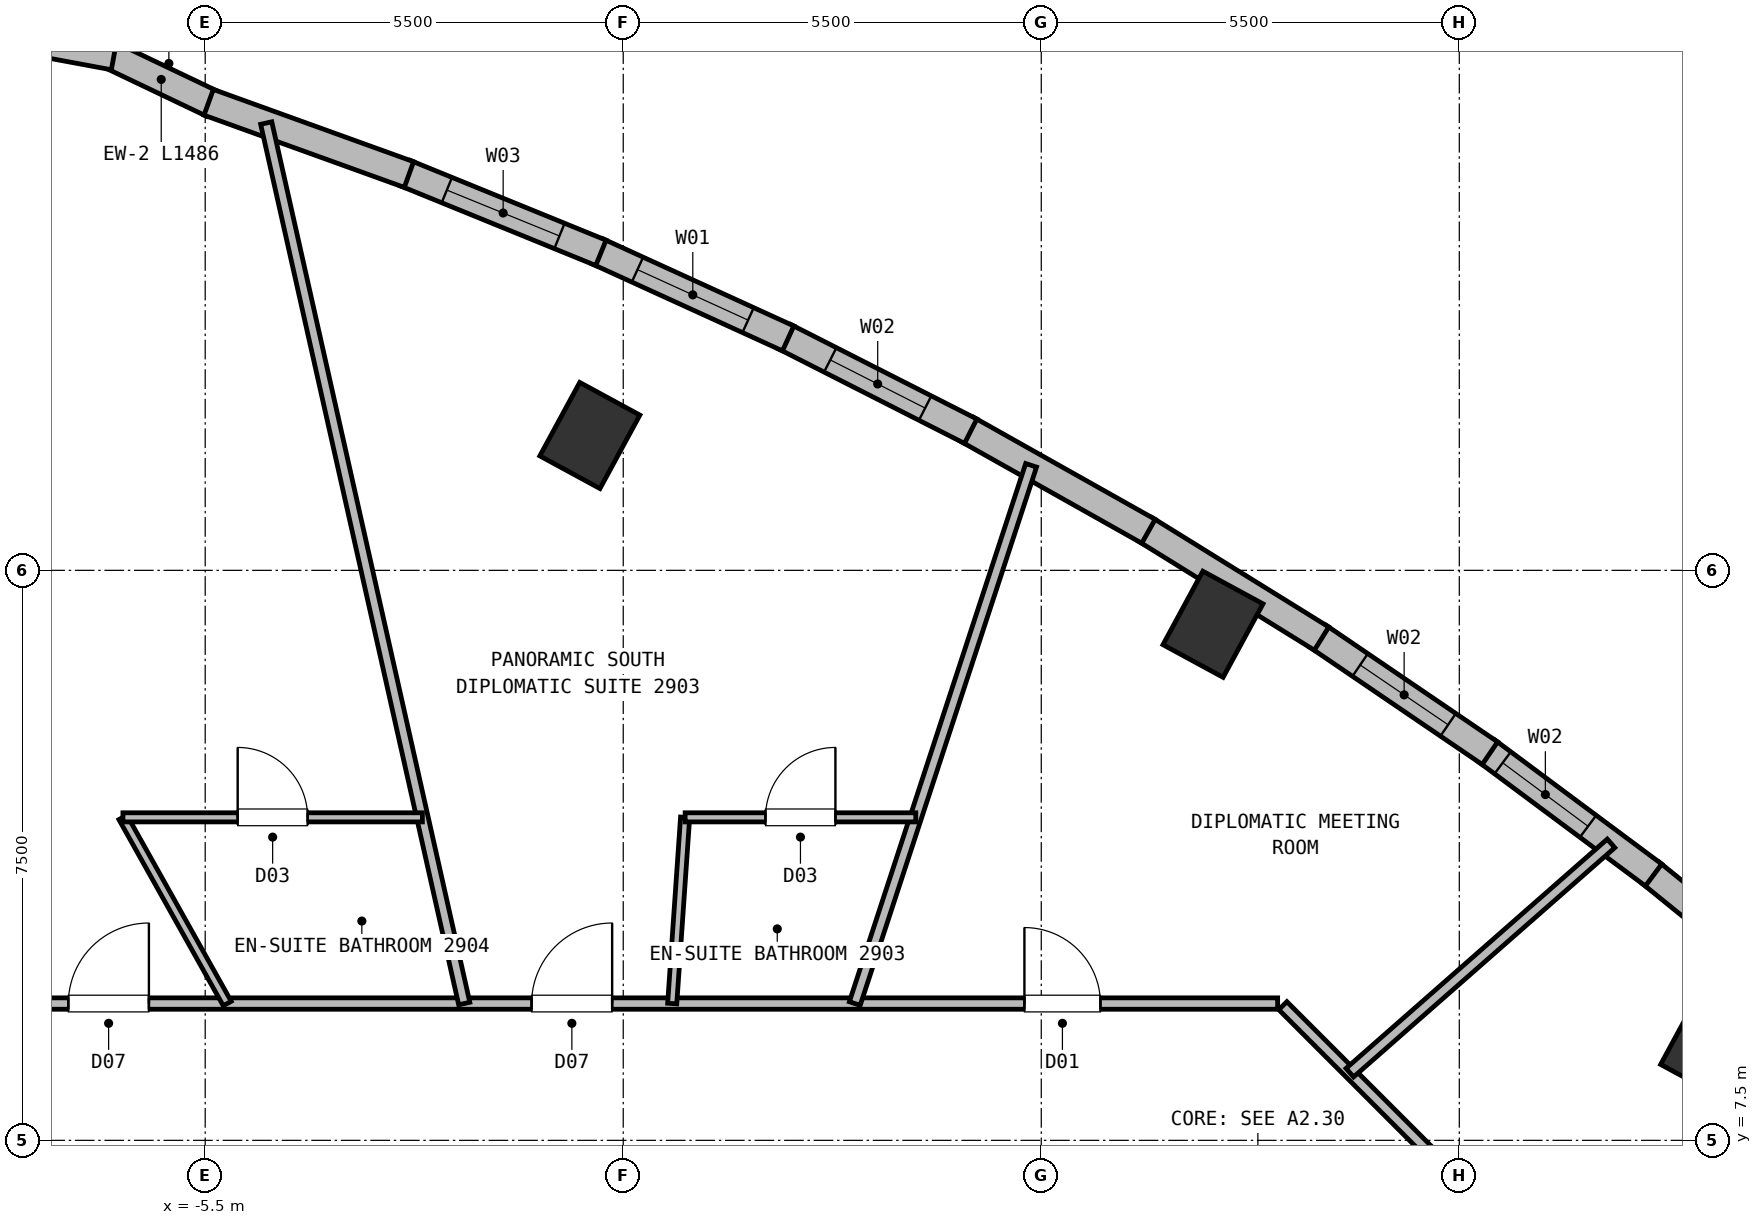
"""IFC4 building model, lengths in metres.
Left out: names, types, materials, properties, quantities, classifications, styles, units other than length and angle.
Written with IfcOpenShell. Run it as: python <this file> out.ifc"""

import sys

from ifc_helpers import new_model, si_unit, direction, frame, frame_2d, origin, origin_2d, place, context, subcontext, project, spatial, rectangle, extrude, element, fill, save


model = new_model("IFC4")
c1 = context("Model", 3, precision=1e-05, world=origin(), true_north=direction((0.0, 1.0)))
c2 = subcontext(c1, "Body", "Model", "MODEL_VIEW")
j1 = project(units=[si_unit("LENGTHUNIT", "METRE"), si_unit("PLANEANGLEUNIT", "RADIAN")], contexts=[c1])
p1 = place(None, origin())
s1 = spatial("IfcSite", under=j1, at=p1, CompositionType="ELEMENT")
p2 = place(p1, origin())
s2 = spatial("IfcBuilding", under=s1, at=p2, CompositionType="ELEMENT")
p3 = place(p2, frame((0.0, 0.0, 108.5)))
s3 = spatial("IfcBuildingStorey", under=s2, at=p3, CompositionType="ELEMENT", Elevation=108.5)
for number, where, z_axis, x_axis in (
    (1, (14.307, 8.767, 0.0), (0.0, 0.0, 1.0), (-0.879, 0.477, 0.0)),
    (2, (7.759, 14.29, 0.0), (0.0, 0.0, 1.0), (-0.879, 0.477, 0.0)),
    (3, (-0.439, 16.774, 0.0), (0.0, 0.0, 1.0), (-0.879, 0.477, 0.0)),
):
    element("IfcColumn", number, at=place(p3, frame(where, z_axis=z_axis, x_axis=x_axis)), inside=s3, PredefinedType="COLUMN", context=c2, shape_type="SweptSolid", body=[
        extrude(rectangle(XDim=0.9, YDim=1.1, at=origin_2d()), origin(), (0.0, 0.0, 1.0), 3.75),
    ])
p4 = place(p3, frame((-6.749, 21.779, 0.0), z_axis=(0.0, 0.0, 1.0), x_axis=(0.902586982789, -0.430507535938, 0.0)))
e4 = element("IfcWall", 4, at=p4, inside=s3, PredefinedType="SOLIDWALL", context=c2, shape_type="SweptSolid", body=[
    extrude(rectangle(XDim=1.486, YDim=0.36, at=frame_2d((0.743, 0.0))), origin(), (0.0, 0.0, 1.0), 3.5),
])
p5 = place(p3, frame((-8.163, 22.034, 0.0), z_axis=(0.0, 0.0, 1.0), x_axis=(0.983262389335, -0.182195152844, 0.0)))
e5 = element("IfcWall", 5, at=p5, inside=s3, PredefinedType="SOLIDWALL", context=c2, shape_type="SweptSolid", body=[
    extrude(rectangle(XDim=1.486, YDim=0.36, at=frame_2d((0.743, 0.0))), origin(), (0.0, 0.0, 1.0), 3.5),
])
p6 = place(p3, frame((13.516, 11.021, 0.0), z_axis=(0.0, 0.0, 1.0), x_axis=(0.776448630517, -0.630180548866, 0.0)))
e6 = element("IfcWall", 6, at=p6, inside=s3, PredefinedType="SOLIDWALL", context=c2, shape_type="SweptSolid", body=[
    extrude(rectangle(XDim=2.744, YDim=0.36, at=frame_2d((1.372, 0.0))), origin(), (0.0, 0.0, 1.0), 3.5),
])
p7 = place(p6, frame((0.672, 0.0, 0.72)))
e7 = element("IfcOpeningElement", 7, at=p7, cuts=e6, PredefinedType="OPENING", context=c2, shape_type="SweptSolid", body=[
    extrude(rectangle(XDim=1.4, YDim=1.84, at=frame_2d((0.7, 0.92))), frame((0.0, 0.19, 0.0), z_axis=(0.0, -1.0, 0.0), x_axis=(1.0, 0.0, 0.0)), (0.0, 0.0, 1.0), 0.38),
])
p8 = place(p3, frame((11.362, 12.623, 0.0), z_axis=(0.0, 0.0, 1.0), x_axis=(0.802329676415, -0.596881135859, 0.0)))
e8 = element("IfcWall", 8, at=p8, inside=s3, PredefinedType="SOLIDWALL", context=c2, shape_type="SweptSolid", body=[
    extrude(rectangle(XDim=2.734, YDim=0.36, at=frame_2d((1.367, 0.0))), origin(), (0.0, 0.0, 1.0), 3.5),
])
p9 = place(p8, frame((0.26, 0.0, 0.72)))
e9 = element("IfcOpeningElement", 9, at=p9, cuts=e8, PredefinedType="OPENING", context=c2, shape_type="SweptSolid", body=[
    extrude(rectangle(XDim=1.4, YDim=1.84, at=frame_2d((0.7, 0.92))), frame((0.0, 0.19, 0.0), z_axis=(0.0, -1.0, 0.0), x_axis=(1.0, 0.0, 0.0)), (0.0, 0.0, 1.0), 0.38),
])
p10 = place(p3, frame((9.146, 14.129, 0.0), z_axis=(0.0, 0.0, 1.0), x_axis=(0.826868273885, -0.562395641557, 0.0)))
e10 = element("IfcWall", 10, at=p10, inside=s3, PredefinedType="SOLIDWALL", context=c2, shape_type="SweptSolid", body=[
    extrude(rectangle(XDim=2.73, YDim=0.36, at=frame_2d((1.365, 0.0))), origin(), (0.0, 0.0, 1.0), 3.5),
])
p11 = place(p10, frame((0.665, 0.0, 0.72)))
e11 = element("IfcOpeningElement", 11, at=p11, cuts=e10, PredefinedType="OPENING", context=c2, shape_type="SweptSolid", body=[
    extrude(rectangle(XDim=1.4, YDim=1.84, at=frame_2d((0.7, 0.92))), frame((0.0, 0.19, 0.0), z_axis=(0.0, -1.0, 0.0), x_axis=(1.0, 0.0, 0.0)), (0.0, 0.0, 1.0), 0.38),
])
p12 = place(p3, frame((6.867, 15.54, 0.0), z_axis=(0.0, 0.0, 1.0), x_axis=(0.850066866235, -0.526674779091, 0.0)))
e12 = element("IfcWall", 12, at=p12, inside=s3, PredefinedType="SOLIDWALL", context=c2, shape_type="SweptSolid", body=[
    extrude(rectangle(XDim=2.73, YDim=0.36, at=frame_2d((1.365, 0.0))), origin(), (0.0, 0.0, 1.0), 3.5),
])
p13 = place(p3, frame((4.527, 16.854, 0.0), z_axis=(0.0, 0.0, 1.0), x_axis=(0.871580305906, -0.490252761702, 0.0)))
e13 = element("IfcWall", 13, at=p13, inside=s3, PredefinedType="SOLIDWALL", context=c2, shape_type="SweptSolid", body=[
    extrude(rectangle(XDim=2.734, YDim=0.36, at=frame_2d((1.367, 0.0))), origin(), (0.0, 0.0, 1.0), 3.5),
])
p14 = place(p3, frame((2.125, 18.073, 0.0), z_axis=(0.0, 0.0, 1.0), x_axis=(0.891561759687, -0.452899137406, 0.0)))
e14 = element("IfcWall", 14, at=p14, inside=s3, PredefinedType="SOLIDWALL", context=c2, shape_type="SweptSolid", body=[
    extrude(rectangle(XDim=2.744, YDim=0.36, at=frame_2d((1.372, 0.0))), origin(), (0.0, 0.0, 1.0), 3.5),
])
p15 = place(p14, frame((0.672, 0.0, 0.72)))
e15 = element("IfcOpeningElement", 15, at=p15, cuts=e14, PredefinedType="OPENING", context=c2, shape_type="SweptSolid", body=[
    extrude(rectangle(XDim=1.4, YDim=1.84, at=frame_2d((0.7, 0.92))), frame((0.0, 0.19, 0.0), z_axis=(0.0, -1.0, 0.0), x_axis=(1.0, 0.0, 0.0)), (0.0, 0.0, 1.0), 0.38),
])
p16 = place(p3, frame((-0.34, 19.198, 0.0), z_axis=(0.0, 0.0, 1.0), x_axis=(0.909692365211, -0.415282796028, 0.0)))
e16 = element("IfcWall", 16, at=p16, inside=s3, PredefinedType="SOLIDWALL", context=c2, shape_type="SweptSolid", body=[
    extrude(rectangle(XDim=2.758, YDim=0.36, at=frame_2d((1.379, 0.0))), origin(), (0.0, 0.0, 1.0), 3.5),
])
p17 = place(p16, frame((0.579, 0.0, 0.72)))
e17 = element("IfcOpeningElement", 17, at=p17, cuts=e16, PredefinedType="OPENING", context=c2, shape_type="SweptSolid", body=[
    extrude(rectangle(XDim=1.6, YDim=1.88, at=frame_2d((0.8, 0.94))), frame((0.0, 0.19, 0.0), z_axis=(0.0, -1.0, 0.0), x_axis=(1.0, 0.0, 0.0)), (0.0, 0.0, 1.0), 0.38),
])
p18 = place(p3, frame((-2.866, 20.226, 0.0), z_axis=(0.0, 0.0, 1.0), x_axis=(0.926106009393, -0.377263381958, 0.0)))
e18 = element("IfcWall", 18, at=p18, inside=s3, PredefinedType="SOLIDWALL", context=c2, shape_type="SweptSolid", body=[
    extrude(rectangle(XDim=2.778, YDim=0.36, at=frame_2d((1.389, 0.0))), origin(), (0.0, 0.0, 1.0), 3.5),
])
p19 = place(p18, frame((0.589, 0.0, 0.72)))
e19 = element("IfcOpeningElement", 19, at=p19, cuts=e18, PredefinedType="OPENING", context=c2, shape_type="SweptSolid", body=[
    extrude(rectangle(XDim=1.6, YDim=1.88, at=frame_2d((0.8, 0.94))), frame((0.0, 0.19, 0.0), z_axis=(0.0, -1.0, 0.0), x_axis=(1.0, 0.0, 0.0)), (0.0, 0.0, 1.0), 0.38),
])
p20 = place(p3, frame((-5.454, 21.159, 0.0), z_axis=(0.0, 0.0, 1.0), x_axis=(0.94061266542, -0.339481683822, 0.0)))
e20 = element("IfcWall", 20, at=p20, inside=s3, PredefinedType="SOLIDWALL", context=c2, shape_type="SweptSolid", body=[
    extrude(rectangle(XDim=2.801, YDim=0.36, at=frame_2d((1.4, 0.0))), origin(), (0.0, 0.0, 1.0), 3.5),
])
p21 = place(p3, frame((8.678, 9.272, 0.0), z_axis=(0.0, 0.0, 1.0), x_axis=(0.707106781187, -0.707106781187, 0.0)))
e21 = element("IfcWall", 21, at=p21, inside=s3, PredefinedType="PARTITIONING", context=c2, shape_type="SweptSolid", body=[
    extrude(rectangle(XDim=2.89, YDim=0.15, at=frame_2d((1.445, 0.0))), origin(), (0.0, 0.0, 1.0), 3.5),
])
p22 = place(p3, frame((-8.61, 9.3, 0.0), z_axis=(0.0, 0.0, 1.0), x_axis=(1.0, 0.0, 0.0)))
e22 = element("IfcWall", 22, at=p22, inside=s3, PredefinedType="PARTITIONING", context=c2, shape_type="SweptSolid", body=[
    extrude(rectangle(XDim=17.22, YDim=0.15, at=frame_2d((8.61, 0.0))), origin(), (0.0, 0.0, 1.0), 3.5),
])
p23 = place(p22, frame((13.888, 0.0, 0.0)))
e23 = element("IfcOpeningElement", 23, at=p23, cuts=e22, PredefinedType="OPENING", context=c2, shape_type="SweptSolid", body=[
    extrude(rectangle(XDim=1.0, YDim=2.15, at=frame_2d((0.5, 1.075))), frame((0.0, 0.085, 0.0), z_axis=(0.0, -1.0, 0.0), x_axis=(1.0, 0.0, 0.0)), (0.0, 0.0, 1.0), 0.17),
])
p24 = place(p22, frame((7.404, 0.0, 0.0)))
e24 = element("IfcOpeningElement", 24, at=p24, cuts=e22, PredefinedType="OPENING", context=c2, shape_type="SweptSolid", body=[
    extrude(rectangle(XDim=1.06, YDim=2.15, at=frame_2d((0.53, 1.075))), frame((0.0, 0.085, 0.0), z_axis=(0.0, -1.0, 0.0), x_axis=(1.0, 0.0, 0.0)), (0.0, 0.0, 1.0), 0.17),
])
p25 = place(p22, frame((1.309, 0.0, 0.0)))
e25 = element("IfcOpeningElement", 25, at=p25, cuts=e22, PredefinedType="OPENING", context=c2, shape_type="SweptSolid", body=[
    extrude(rectangle(XDim=1.06, YDim=2.15, at=frame_2d((0.53, 1.075))), frame((0.0, 0.085, 0.0), z_axis=(0.0, -1.0, 0.0), x_axis=(1.0, 0.0, 0.0)), (0.0, 0.0, 1.0), 0.17),
])
p26 = place(p3, frame((9.56, 8.39, 0.0), z_axis=(0.0, 0.0, 1.0), x_axis=(0.751553842158, 0.659671753478, 0.0)))
e26 = element("IfcWall", 26, at=p26, inside=s3, PredefinedType="PARTITIONING", context=c2, shape_type="SweptSolid", body=[
    extrude(rectangle(XDim=4.573, YDim=0.15, at=frame_2d((2.287, 0.0))), origin(), (0.0, 0.0, 1.0), 3.5),
])
p27 = place(p3, frame((3.046, 9.3, 0.0), z_axis=(0.0, 0.0, 1.0), x_axis=(0.31130966002, 0.950308526521, 0.0)))
e27 = element("IfcWall", 27, at=p27, inside=s3, PredefinedType="PARTITIONING", context=c2, shape_type="SweptSolid", body=[
    extrude(rectangle(XDim=7.453, YDim=0.15, at=frame_2d((3.726, 0.0))), origin(), (0.0, 0.0, 1.0), 3.5),
])
p28 = place(p3, frame((0.644, 9.3, 0.0), z_axis=(0.0, 0.0, 1.0), x_axis=(0.069191030047, 0.997603428904, 0.0)))
e28 = element("IfcWall", 28, at=p28, inside=s3, PredefinedType="PARTITIONING", context=c2, shape_type="SweptSolid", body=[
    extrude(rectangle(XDim=2.456, YDim=0.12, at=frame_2d((1.228, 0.0))), origin(), (0.0, 0.0, 1.0), 3.5),
])
p29 = place(p3, frame((0.814, 11.75, 0.0), z_axis=(0.0, 0.0, 1.0), x_axis=(1.0, 0.0, 0.0)))
e29 = element("IfcWall", 29, at=p29, inside=s3, PredefinedType="PARTITIONING", context=c2, shape_type="SweptSolid", body=[
    extrude(rectangle(XDim=3.035, YDim=0.12, at=frame_2d((1.518, 0.0))), origin(), (0.0, 0.0, 1.0), 3.5),
])
p30 = place(p29, frame((1.057, 0.0, 0.0)))
e30 = element("IfcOpeningElement", 30, at=p30, cuts=e29, PredefinedType="OPENING", context=c2, shape_type="SweptSolid", body=[
    extrude(rectangle(XDim=0.92, YDim=2.1, at=frame_2d((0.46, 1.05))), frame((0.0, 0.07, 0.0), z_axis=(0.0, -1.0, 0.0), x_axis=(1.0, 0.0, 0.0)), (0.0, 0.0, 1.0), 0.14),
])
p31 = place(p3, frame((-2.092, 9.3, 0.0), z_axis=(0.0, 0.0, 1.0), x_axis=(-0.219430983932, 0.975628025064, 0.0)))
e31 = element("IfcWall", 31, at=p31, inside=s3, PredefinedType="PARTITIONING", context=c2, shape_type="SweptSolid", body=[
    extrude(rectangle(XDim=11.875, YDim=0.15, at=frame_2d((5.938, 0.0))), origin(), (0.0, 0.0, 1.0), 3.5),
])
p32 = place(p3, frame((-5.21, 9.3, 0.0), z_axis=(0.0, 0.0, 1.0), x_axis=(-0.488696025712, 0.87245412169, 0.0)))
e32 = element("IfcWall", 32, at=p32, inside=s3, PredefinedType="PARTITIONING", context=c2, shape_type="SweptSolid", body=[
    extrude(rectangle(XDim=2.808, YDim=0.12, at=frame_2d((1.404, 0.0))), origin(), (0.0, 0.0, 1.0), 3.5),
])
p33 = place(p3, frame((-6.583, 11.75, 0.0), z_axis=(0.0, 0.0, 1.0), x_axis=(1.0, 0.0, 0.0)))
e33 = element("IfcWall", 33, at=p33, inside=s3, PredefinedType="PARTITIONING", context=c2, shape_type="SweptSolid", body=[
    extrude(rectangle(XDim=3.94, YDim=0.12, at=frame_2d((1.97, 0.0))), origin(), (0.0, 0.0, 1.0), 3.5),
])
p34 = place(p33, frame((1.51, 0.0, 0.0)))
e34 = element("IfcOpeningElement", 34, at=p34, cuts=e33, PredefinedType="OPENING", context=c2, shape_type="SweptSolid", body=[
    extrude(rectangle(XDim=0.92, YDim=2.1, at=frame_2d((0.46, 1.05))), frame((0.0, 0.07, 0.0), z_axis=(0.0, -1.0, 0.0), x_axis=(1.0, 0.0, 0.0)), (0.0, 0.0, 1.0), 0.14),
])
p35 = place(p9, origin())
e35 = element("IfcWindow", 35, at=p35, inside=s3, PartitioningType="SINGLE_PANEL", PredefinedType="WINDOW", context=c2, shape_type="SweptSolid", body=[
    extrude(rectangle(XDim=1.4, YDim=1.84, at=frame_2d((0.7, 0.92))), frame((0.0, 0.03, 0.0), z_axis=(0.0, -1.0, 0.0), x_axis=(1.0, 0.0, 0.0)), (0.0, 0.0, 1.0), 0.06),
])
fill(e9, e35)
p36 = place(p11, origin())
e36 = element("IfcWindow", 36, at=p36, inside=s3, PartitioningType="SINGLE_PANEL", PredefinedType="WINDOW", context=c2, shape_type="SweptSolid", body=[
    extrude(rectangle(XDim=1.4, YDim=1.84, at=frame_2d((0.7, 0.92))), frame((0.0, 0.03, 0.0), z_axis=(0.0, -1.0, 0.0), x_axis=(1.0, 0.0, 0.0)), (0.0, 0.0, 1.0), 0.06),
])
fill(e11, e36)
p37 = place(p15, origin())
e37 = element("IfcWindow", 37, at=p37, inside=s3, PartitioningType="SINGLE_PANEL", PredefinedType="WINDOW", context=c2, shape_type="SweptSolid", body=[
    extrude(rectangle(XDim=1.4, YDim=1.84, at=frame_2d((0.7, 0.92))), frame((0.0, 0.03, 0.0), z_axis=(0.0, -1.0, 0.0), x_axis=(1.0, 0.0, 0.0)), (0.0, 0.0, 1.0), 0.06),
])
fill(e15, e37)
p38 = place(p17, origin())
e38 = element("IfcWindow", 38, at=p38, inside=s3, PartitioningType="SINGLE_PANEL", PredefinedType="WINDOW", context=c2, shape_type="SweptSolid", body=[
    extrude(rectangle(XDim=1.6, YDim=1.88, at=frame_2d((0.8, 0.94))), frame((0.0, 0.03, 0.0), z_axis=(0.0, -1.0, 0.0), x_axis=(1.0, 0.0, 0.0)), (0.0, 0.0, 1.0), 0.06),
])
fill(e17, e38)
p39 = place(p19, origin())
e39 = element("IfcWindow", 39, at=p39, inside=s3, PartitioningType="SINGLE_PANEL", PredefinedType="WINDOW", context=c2, shape_type="SweptSolid", body=[
    extrude(rectangle(XDim=1.6, YDim=1.88, at=frame_2d((0.8, 0.94))), frame((0.0, 0.03, 0.0), z_axis=(0.0, -1.0, 0.0), x_axis=(1.0, 0.0, 0.0)), (0.0, 0.0, 1.0), 0.06),
])
fill(e19, e39)
p40 = place(p30, origin())
e40 = element("IfcDoor", 40, at=p40, inside=s3, OperationType="SINGLE_SWING_RIGHT", PredefinedType="DOOR", context=c2, shape_type="SweptSolid", body=[
    extrude(rectangle(XDim=0.92, YDim=2.1, at=frame_2d((0.46, 1.05))), frame((0.0, 0.025, 0.0), z_axis=(0.0, -1.0, 0.0), x_axis=(1.0, 0.0, 0.0)), (0.0, 0.0, 1.0), 0.05),
])
fill(e30, e40)
p41 = place(p34, origin())
e41 = element("IfcDoor", 41, at=p41, inside=s3, OperationType="SINGLE_SWING_LEFT", PredefinedType="DOOR", context=c2, shape_type="SweptSolid", body=[
    extrude(rectangle(XDim=0.92, YDim=2.1, at=frame_2d((0.46, 1.05))), frame((0.0, 0.025, 0.0), z_axis=(0.0, -1.0, 0.0), x_axis=(1.0, 0.0, 0.0)), (0.0, 0.0, 1.0), 0.05),
])
fill(e34, e41)
p42 = place(p23, origin())
e42 = element("IfcDoor", 42, at=p42, inside=s3, OperationType="SINGLE_SWING_LEFT", PredefinedType="DOOR", context=c2, shape_type="SweptSolid", body=[
    extrude(rectangle(XDim=1.0, YDim=2.15, at=frame_2d((0.5, 1.075))), frame((0.0, 0.025, 0.0), z_axis=(0.0, -1.0, 0.0), x_axis=(1.0, 0.0, 0.0)), (0.0, 0.0, 1.0), 0.05),
])
fill(e23, e42)
p43 = place(p24, origin())
e43 = element("IfcDoor", 43, at=p43, inside=s3, OperationType="SINGLE_SWING_RIGHT", PredefinedType="DOOR", context=c2, shape_type="SweptSolid", body=[
    extrude(rectangle(XDim=1.06, YDim=2.15, at=frame_2d((0.53, 1.075))), frame((0.0, 0.025, 0.0), z_axis=(0.0, -1.0, 0.0), x_axis=(1.0, 0.0, 0.0)), (0.0, 0.0, 1.0), 0.05),
])
fill(e24, e43)
p44 = place(p25, origin())
e44 = element("IfcDoor", 44, at=p44, inside=s3, OperationType="SINGLE_SWING_RIGHT", PredefinedType="DOOR", context=c2, shape_type="SweptSolid", body=[
    extrude(rectangle(XDim=1.06, YDim=2.15, at=frame_2d((0.53, 1.075))), frame((0.0, 0.025, 0.0), z_axis=(0.0, -1.0, 0.0), x_axis=(1.0, 0.0, 0.0)), (0.0, 0.0, 1.0), 0.05),
])
fill(e25, e44)
save(model, sys.argv[1])
